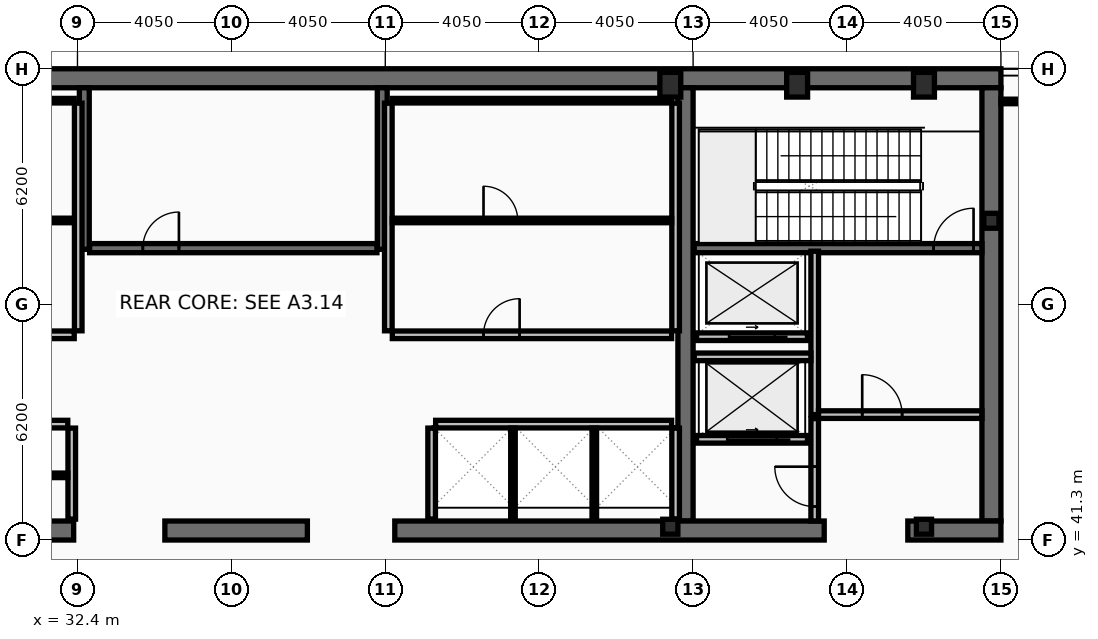
"""IFC4 building model, lengths in metres.
Left out: names, types, materials, properties, quantities, classifications, styles, units other than length and angle.
Written with IfcOpenShell. Run it as: python <this file> out.ifc"""

import sys

from ifc_helpers import new_model, si_unit, direction, frame, frame_2d, origin, origin_2d, place, context, subcontext, project, spatial, rectangle, hollow_rectangle, i_section, extrude, element, fill, save


model = new_model("IFC4")
c1 = context("Model", 3, precision=1e-05, world=origin(), true_north=direction((0.0, 1.0)))
c2 = subcontext(c1, "Body", "Model", "MODEL_VIEW")
j1 = project(units=[si_unit("LENGTHUNIT", "METRE"), si_unit("PLANEANGLEUNIT", "RADIAN")], contexts=[c1])
p1 = place(None, origin())
s1 = spatial("IfcSite", under=j1, at=p1, CompositionType="ELEMENT")
p2 = place(p1, origin())
s2 = spatial("IfcBuilding", under=s1, at=p2, CompositionType="ELEMENT")
p3 = place(p2, frame((0.0, 0.0, 350.6)))
s3 = spatial("IfcBuildingStorey", under=s2, at=p3, CompositionType="ELEMENT", Elevation=350.6)
p4 = place(p3, frame((16.2, 53.45, 0.0), z_axis=(0.0, 0.0, 1.0), x_axis=(1.0, 0.0, 0.0)))
e1 = element("IfcWall", 1, at=p4, inside=s3, PredefinedType="SHEAR", context=c2, shape_type="SweptSolid", body=[
    extrude(rectangle(XDim=40.5, YDim=0.5, at=frame_2d((20.25, 0.0))), origin(), (0.0, 0.0, 1.0), 5.4),
])
p5 = place(p3, frame((56.45, 53.2, 0.0), z_axis=(0.0, 0.0, 1.0), x_axis=(0.0, -1.0, 0.0)))
e2 = element("IfcWall", 2, at=p5, inside=s3, PredefinedType="SHEAR", context=c2, shape_type="SweptSolid", body=[
    extrude(rectangle(XDim=11.4, YDim=0.5, at=frame_2d((5.7, 0.0))), origin(), (0.0, 0.0, 1.0), 5.4),
])
p6 = place(p3, frame((48.4, 41.8, 0.0), z_axis=(0.0, 0.0, 1.0), x_axis=(0.0, 1.0, 0.0)))
e3 = element("IfcWall", 3, at=p6, inside=s3, PredefinedType="SHEAR", context=c2, shape_type="SweptSolid", body=[
    extrude(rectangle(XDim=11.4, YDim=0.4, at=frame_2d((5.7, 0.0))), origin(), (0.0, 0.0, 1.0), 5.4),
])
p7 = place(p3, frame((32.3, 41.55, 0.0), z_axis=(0.0, 0.0, 1.0), x_axis=(-1.0, 0.0, 0.0)))
e4 = element("IfcWall", 4, at=p7, inside=s3, PredefinedType="SHEAR", context=c2, shape_type="SweptSolid", body=[
    extrude(rectangle(XDim=11.45, YDim=0.5, at=frame_2d((5.725, 0.0))), origin(), (0.0, 0.0, 1.0), 5.4),
])
p8 = place(p3, frame((38.45, 41.55, 0.0), z_axis=(0.0, 0.0, 1.0), x_axis=(-1.0, 0.0, 0.0)))
e5 = element("IfcWall", 5, at=p8, inside=s3, PredefinedType="SHEAR", context=c2, shape_type="SweptSolid", body=[
    extrude(rectangle(XDim=3.75, YDim=0.5, at=frame_2d((1.875, 0.0))), origin(), (0.0, 0.0, 1.0), 5.4),
])
p9 = place(p3, frame((52.05, 41.55, 0.0), z_axis=(0.0, 0.0, 1.0), x_axis=(-1.0, 0.0, 0.0)))
e6 = element("IfcWall", 6, at=p9, inside=s3, PredefinedType="SHEAR", context=c2, shape_type="SweptSolid", body=[
    extrude(rectangle(XDim=11.3, YDim=0.5, at=frame_2d((5.65, 0.0))), origin(), (0.0, 0.0, 1.0), 5.4),
])
p10 = place(p3, frame((56.7, 41.55, 0.0), z_axis=(0.0, 0.0, 1.0), x_axis=(-1.0, 0.0, 0.0)))
e7 = element("IfcWall", 7, at=p10, inside=s3, PredefinedType="SHEAR", context=c2, shape_type="SweptSolid", body=[
    extrude(rectangle(XDim=2.45, YDim=0.5, at=frame_2d((1.225, 0.0))), origin(), (0.0, 0.0, 1.0), 5.4),
])
for number, where, z_axis, x_axis in (
    (8, (32.58, 48.95, 0.0), (0.0, 0.0, 1.0), (0.0, 1.0, 0.0)),
    (9, (40.42, 48.95, 0.0), (0.0, 0.0, 1.0), (0.0, 1.0, 0.0)),
):
    element("IfcWall", number, at=place(p3, frame(where, z_axis=z_axis, x_axis=x_axis)), inside=s3, PredefinedType="SHEAR", context=c2, shape_type="SweptSolid", body=[
        extrude(rectangle(XDim=4.25, YDim=0.26, at=frame_2d((2.125, 0.0))), origin(), (0.0, 0.0, 1.0), 5.4),
    ])
p11 = place(p3, frame((48.63, 48.98, 0.0), z_axis=(0.0, 0.0, 1.0), x_axis=(1.0, 0.0, 0.0)))
e10 = element("IfcWall", 10, at=p11, inside=s3, PredefinedType="SHEAR", context=c2, shape_type="SweptSolid", body=[
    extrude(rectangle(XDim=7.57, YDim=0.24, at=frame_2d((3.785, 0.0))), origin(), (0.0, 0.0, 1.0), 5.4),
])
p12 = place(p11, frame((6.3, 0.0, 0.0)))
e11 = element("IfcOpeningElement", 11, at=p12, cuts=e10, PredefinedType="OPENING", context=c2, shape_type="SweptSolid", body=[
    extrude(rectangle(XDim=1.05, YDim=2.15, at=frame_2d((0.525, 1.075))), frame((0.0, 0.13, 0.0), z_axis=(0.0, -1.0, 0.0), x_axis=(1.0, 0.0, 0.0)), (0.0, 0.0, 1.0), 0.26),
])
p13 = place(p3, frame((32.72, 48.98, 0.0), z_axis=(0.0, 0.0, 1.0), x_axis=(1.0, 0.0, 0.0)))
e12 = element("IfcWall", 12, at=p13, inside=s3, PredefinedType="SHEAR", context=c2, shape_type="SweptSolid", body=[
    extrude(rectangle(XDim=7.56, YDim=0.24, at=frame_2d((3.78, 0.0))), origin(), (0.0, 0.0, 1.0), 5.4),
])
p14 = place(p13, frame((1.4, 0.0, 0.0)))
e13 = element("IfcOpeningElement", 13, at=p14, cuts=e12, PredefinedType="OPENING", context=c2, shape_type="SweptSolid", body=[
    extrude(rectangle(XDim=0.95, YDim=2.1, at=frame_2d((0.475, 1.05))), frame((0.0, 0.13, 0.0), z_axis=(0.0, -1.0, 0.0), x_axis=(1.0, 0.0, 0.0)), (0.0, 0.0, 1.0), 0.26),
])
for number, where, z_axis, x_axis in (
    (14, (48.0, 53.28, 0.0), (0.0, 0.0, 1.0), (1.0, 0.0, 0.0)),
    (15, (51.337, 53.28, 0.0), (0.0, 0.0, 1.0), (1.0, 0.0, 0.0)),
    (16, (54.675, 53.28, 0.0), (0.0, 0.0, 1.0), (1.0, 0.0, 0.0)),
):
    element("IfcColumn", number, at=place(p3, frame(where, z_axis=z_axis, x_axis=x_axis)), inside=s3, PredefinedType="COLUMN", context=c2, shape_type="SweptSolid", body=[
        extrude(hollow_rectangle(XDim=0.55, YDim=0.65, WallThickness=0.04, at=origin_2d()), origin(), (0.0, 0.0, 1.0), 5.6),
    ])
for number, where, z_axis, x_axis in (
    (17, (56.45, 49.7, 0.0), (0.0, 0.0, 1.0), (1.0, 0.0, 0.0)),
    (18, (48.0, 41.65, 0.0), (0.0, 0.0, 1.0), (1.0, 0.0, 0.0)),
    (19, (54.675, 41.65, 0.0), (0.0, 0.0, 1.0), (1.0, 0.0, 0.0)),
):
    element("IfcColumn", number, at=place(p3, frame(where, z_axis=z_axis, x_axis=x_axis)), inside=s3, PredefinedType="COLUMN", context=c2, shape_type="SweptSolid", body=[
        extrude(i_section(OverallWidth=0.399, OverallDepth=0.393, WebThickness=0.023, FlangeThickness=0.037, at=origin_2d()), origin(), (0.0, 0.0, 1.0), 5.6),
    ])
p15 = place(p3, frame((51.61, 43.95, 0.0), z_axis=(0.0, 0.0, 1.0), x_axis=(-1.0, 0.0, 0.0)))
e20 = element("IfcWall", 20, at=p15, inside=s3, PredefinedType="PARTITIONING", context=c2, shape_type="SweptSolid", body=[
    extrude(rectangle(XDim=2.92, YDim=0.2, at=frame_2d((1.46, 0.0))), origin(), (0.0, 0.0, 1.0), 5.4),
])
p16 = place(p15, frame((0.81, 0.0, 0.0)))
e21 = element("IfcOpeningElement", 21, at=p16, cuts=e20, PredefinedType="OPENING", context=c2, shape_type="SweptSolid", body=[
    extrude(rectangle(XDim=1.3, YDim=2.18, at=frame_2d((0.65, 1.09))), frame((0.0, 0.11, 0.0), z_axis=(0.0, -1.0, 0.0), x_axis=(1.0, 0.0, 0.0)), (0.0, 0.0, 1.0), 0.22),
])
p17 = place(p3, frame((51.61, 46.65, 0.0), z_axis=(0.0, 0.0, 1.0), x_axis=(-1.0, 0.0, 0.0)))
e22 = element("IfcWall", 22, at=p17, inside=s3, PredefinedType="PARTITIONING", context=c2, shape_type="SweptSolid", body=[
    extrude(rectangle(XDim=2.92, YDim=0.2, at=frame_2d((1.46, 0.0))), origin(), (0.0, 0.0, 1.0), 5.4),
])
p18 = place(p17, frame((0.86, 0.0, 0.0)))
e23 = element("IfcOpeningElement", 23, at=p18, cuts=e22, PredefinedType="OPENING", context=c2, shape_type="SweptSolid", body=[
    extrude(rectangle(XDim=1.2, YDim=2.18, at=frame_2d((0.6, 1.09))), frame((0.0, 0.11, 0.0), z_axis=(0.0, -1.0, 0.0), x_axis=(1.0, 0.0, 0.0)), (0.0, 0.0, 1.0), 0.22),
])
p19 = place(p3, frame((51.8, 44.6, 0.0), z_axis=(0.0, 0.0, 1.0), x_axis=(0.0, 1.0, 0.0)))
e24 = element("IfcWall", 24, at=p19, inside=s3, PredefinedType="PARTITIONING", context=c2, shape_type="SweptSolid", body=[
    extrude(rectangle(XDim=4.3, YDim=0.2, at=frame_2d((2.15, 0.0))), origin(), (0.0, 0.0, 1.0), 5.4),
])
p20 = place(p3, frame((51.9, 44.6, 0.0), z_axis=(0.0, 0.0, 1.0), x_axis=(1.0, 0.0, 0.0)))
e25 = element("IfcWall", 25, at=p20, inside=s3, PredefinedType="PARTITIONING", context=c2, shape_type="SweptSolid", body=[
    extrude(rectangle(XDim=4.3, YDim=0.2, at=frame_2d((2.15, 0.0))), origin(), (0.0, 0.0, 1.0), 5.4),
])
p21 = place(p20, frame((1.15, 0.0, 0.0)))
e26 = element("IfcOpeningElement", 26, at=p21, cuts=e25, PredefinedType="OPENING", context=c2, shape_type="SweptSolid", body=[
    extrude(rectangle(XDim=1.05, YDim=2.15, at=frame_2d((0.525, 1.075))), frame((0.0, 0.11, 0.0), z_axis=(0.0, -1.0, 0.0), x_axis=(1.0, 0.0, 0.0)), (0.0, 0.0, 1.0), 0.22),
])
p22 = place(p3, frame((48.63, 46.12, 0.0), z_axis=(0.0, 0.0, 1.0), x_axis=(1.0, 0.0, 0.0)))
e27 = element("IfcWall", 27, at=p22, inside=s3, PredefinedType="PARTITIONING", context=c2, shape_type="SweptSolid", body=[
    extrude(rectangle(XDim=3.07, YDim=0.2, at=frame_2d((1.535, 0.0))), origin(), (0.0, 0.0, 1.0), 5.4),
])
p23 = place(p3, frame((51.8, 41.8, 0.0), z_axis=(0.0, 0.0, 1.0), x_axis=(0.0, 1.0, 0.0)))
e28 = element("IfcWall", 28, at=p23, inside=s3, PredefinedType="PARTITIONING", context=c2, shape_type="SweptSolid", body=[
    extrude(rectangle(XDim=2.695, YDim=0.2, at=frame_2d((1.348, 0.0))), origin(), (0.0, 0.0, 1.0), 5.4),
])
p24 = place(p23, frame((0.38, 0.0, 0.0)))
e29 = element("IfcOpeningElement", 29, at=p24, cuts=e28, PredefinedType="OPENING", context=c2, shape_type="SweptSolid", body=[
    extrude(rectangle(XDim=1.05, YDim=2.15, at=frame_2d((0.525, 1.075))), frame((0.0, 0.11, 0.0), z_axis=(0.0, -1.0, 0.0), x_axis=(1.0, 0.0, 0.0)), (0.0, 0.0, 1.0), 0.22),
])
p25 = place(p3, frame((32.42, 46.805, 0.0), z_axis=(0.0, 0.0, 1.0), x_axis=(0.0, 1.0, 0.0)))
e30 = element("IfcWall", 30, at=p25, inside=s3, PredefinedType="PARTITIONING", context=c2, shape_type="SweptSolid", body=[
    extrude(rectangle(XDim=5.99, YDim=0.2, at=frame_2d((2.995, 0.0))), origin(), (0.0, 0.0, 1.0), 5.4),
])
p26 = place(p3, frame((24.805, 52.86, 0.0), z_axis=(0.0, 0.0, 1.0), x_axis=(1.0, 0.0, 0.0)))
e31 = element("IfcWall", 31, at=p26, inside=s3, PredefinedType="PARTITIONING", context=c2, shape_type="SweptSolid", body=[
    extrude(rectangle(XDim=7.51, YDim=0.12, at=frame_2d((3.755, 0.0))), origin(), (0.0, 0.0, 1.0), 5.4),
])
p27 = place(p3, frame((24.805, 49.709, 0.0), z_axis=(0.0, 0.0, 1.0), x_axis=(1.0, 0.0, 0.0)))
e32 = element("IfcWall", 32, at=p27, inside=s3, PredefinedType="PARTITIONING", context=c2, shape_type="SweptSolid", body=[
    extrude(rectangle(XDim=7.51, YDim=0.12, at=frame_2d((3.755, 0.0))), origin(), (0.0, 0.0, 1.0), 5.4),
])
p28 = place(p27, frame((2.4, 0.0, 0.0)))
e33 = element("IfcOpeningElement", 33, at=p28, cuts=e32, PredefinedType="OPENING", context=c2, shape_type="SweptSolid", body=[
    extrude(rectangle(XDim=0.9, YDim=2.05, at=frame_2d((0.45, 1.025))), frame((0.0, 0.07, 0.0), z_axis=(0.0, -1.0, 0.0), x_axis=(1.0, 0.0, 0.0)), (0.0, 0.0, 1.0), 0.14),
])
p29 = place(p3, frame((24.805, 46.7, 0.0), z_axis=(0.0, 0.0, 1.0), x_axis=(1.0, 0.0, 0.0)))
e34 = element("IfcWall", 34, at=p29, inside=s3, PredefinedType="PARTITIONING", context=c2, shape_type="SweptSolid", body=[
    extrude(rectangle(XDim=7.51, YDim=0.2, at=frame_2d((3.755, 0.0))), origin(), (0.0, 0.0, 1.0), 5.4),
])
p30 = place(p29, frame((2.4, 0.0, 0.0)))
e35 = element("IfcOpeningElement", 35, at=p30, cuts=e34, PredefinedType="OPENING", context=c2, shape_type="SweptSolid", body=[
    extrude(rectangle(XDim=0.95, YDim=2.1, at=frame_2d((0.475, 1.05))), frame((0.0, 0.11, 0.0), z_axis=(0.0, -1.0, 0.0), x_axis=(1.0, 0.0, 0.0)), (0.0, 0.0, 1.0), 0.22),
])
p31 = place(p3, frame((32.25, 41.85, 0.0), z_axis=(0.0, 0.0, 1.0), x_axis=(0.0, 1.0, 0.0)))
e36 = element("IfcWall", 36, at=p31, inside=s3, PredefinedType="PARTITIONING", context=c2, shape_type="SweptSolid", body=[
    extrude(rectangle(XDim=2.395, YDim=0.2, at=frame_2d((1.198, 0.0))), origin(), (0.0, 0.0, 1.0), 5.4),
])
p32 = place(p3, frame((24.805, 43.002, 0.0), z_axis=(0.0, 0.0, 1.0), x_axis=(1.0, 0.0, 0.0)))
e37 = element("IfcWall", 37, at=p32, inside=s3, PredefinedType="PARTITIONING", context=c2, shape_type="SweptSolid", body=[
    extrude(rectangle(XDim=7.34, YDim=0.12, at=frame_2d((3.67, 0.0))), origin(), (0.0, 0.0, 1.0), 5.4),
])
p33 = place(p32, frame((2.4, 0.0, 0.0)))
e38 = element("IfcOpeningElement", 38, at=p33, cuts=e37, PredefinedType="OPENING", context=c2, shape_type="SweptSolid", body=[
    extrude(rectangle(XDim=0.9, YDim=2.05, at=frame_2d((0.45, 1.025))), frame((0.0, 0.07, 0.0), z_axis=(0.0, -1.0, 0.0), x_axis=(1.0, 0.0, 0.0)), (0.0, 0.0, 1.0), 0.14),
])
p34 = place(p3, frame((24.805, 44.35, 0.0), z_axis=(0.0, 0.0, 1.0), x_axis=(1.0, 0.0, 0.0)))
e39 = element("IfcWall", 39, at=p34, inside=s3, PredefinedType="PARTITIONING", context=c2, shape_type="SweptSolid", body=[
    extrude(rectangle(XDim=7.34, YDim=0.2, at=frame_2d((3.67, 0.0))), origin(), (0.0, 0.0, 1.0), 5.4),
])
p35 = place(p34, frame((2.4, 0.0, 0.0)))
e40 = element("IfcOpeningElement", 40, at=p35, cuts=e39, PredefinedType="OPENING", context=c2, shape_type="SweptSolid", body=[
    extrude(rectangle(XDim=0.95, YDim=2.1, at=frame_2d((0.475, 1.05))), frame((0.0, 0.11, 0.0), z_axis=(0.0, -1.0, 0.0), x_axis=(1.0, 0.0, 0.0)), (0.0, 0.0, 1.0), 0.22),
])
for number, where, z_axis, x_axis in (
    (41, (40.58, 46.805, 0.0), (0.0, 0.0, 1.0), (0.0, 1.0, 0.0)),
    (42, (48.14, 46.805, 0.0), (0.0, 0.0, 1.0), (0.0, 1.0, 0.0)),
):
    element("IfcWall", number, at=place(p3, frame(where, z_axis=z_axis, x_axis=x_axis)), inside=s3, PredefinedType="PARTITIONING", context=c2, shape_type="SweptSolid", body=[
        extrude(rectangle(XDim=5.99, YDim=0.2, at=frame_2d((2.995, 0.0))), origin(), (0.0, 0.0, 1.0), 5.4),
    ])
p36 = place(p3, frame((40.685, 52.86, 0.0), z_axis=(0.0, 0.0, 1.0), x_axis=(1.0, 0.0, 0.0)))
e43 = element("IfcWall", 43, at=p36, inside=s3, PredefinedType="PARTITIONING", context=c2, shape_type="SweptSolid", body=[
    extrude(rectangle(XDim=7.35, YDim=0.12, at=frame_2d((3.675, 0.0))), origin(), (0.0, 0.0, 1.0), 5.4),
])
p37 = place(p3, frame((40.685, 49.709, 0.0), z_axis=(0.0, 0.0, 1.0), x_axis=(1.0, 0.0, 0.0)))
e44 = element("IfcWall", 44, at=p37, inside=s3, PredefinedType="PARTITIONING", context=c2, shape_type="SweptSolid", body=[
    extrude(rectangle(XDim=7.35, YDim=0.12, at=frame_2d((3.675, 0.0))), origin(), (0.0, 0.0, 1.0), 5.4),
])
p38 = place(p37, frame((2.4, 0.0, 0.0)))
e45 = element("IfcOpeningElement", 45, at=p38, cuts=e44, PredefinedType="OPENING", context=c2, shape_type="SweptSolid", body=[
    extrude(rectangle(XDim=0.9, YDim=2.05, at=frame_2d((0.45, 1.025))), frame((0.0, 0.07, 0.0), z_axis=(0.0, -1.0, 0.0), x_axis=(1.0, 0.0, 0.0)), (0.0, 0.0, 1.0), 0.14),
])
p39 = place(p3, frame((40.685, 46.7, 0.0), z_axis=(0.0, 0.0, 1.0), x_axis=(1.0, 0.0, 0.0)))
e46 = element("IfcWall", 46, at=p39, inside=s3, PredefinedType="PARTITIONING", context=c2, shape_type="SweptSolid", body=[
    extrude(rectangle(XDim=7.35, YDim=0.2, at=frame_2d((3.675, 0.0))), origin(), (0.0, 0.0, 1.0), 5.4),
])
p40 = place(p39, frame((2.4, 0.0, 0.0)))
e47 = element("IfcOpeningElement", 47, at=p40, cuts=e46, PredefinedType="OPENING", context=c2, shape_type="SweptSolid", body=[
    extrude(rectangle(XDim=0.95, YDim=2.1, at=frame_2d((0.475, 1.05))), frame((0.0, 0.11, 0.0), z_axis=(0.0, -1.0, 0.0), x_axis=(1.0, 0.0, 0.0)), (0.0, 0.0, 1.0), 0.22),
])
p41 = place(p3, frame((41.825, 44.35, 0.0), z_axis=(0.0, 0.0, 1.0), x_axis=(1.0, 0.0, 0.0)))
e48 = element("IfcWall", 48, at=p41, inside=s3, PredefinedType="PARTITIONING", context=c2, shape_type="SweptSolid", body=[
    extrude(rectangle(XDim=6.21, YDim=0.2, at=frame_2d((3.105, 0.0))), origin(), (0.0, 0.0, 1.0), 5.4),
])
for number, where, z_axis, x_axis in (
    (49, (41.72, 41.85, 0.0), (0.0, 0.0, 1.0), (0.0, 1.0, 0.0)),
    (50, (48.14, 41.85, 0.0), (0.0, 0.0, 1.0), (0.0, 1.0, 0.0)),
):
    element("IfcWall", number, at=place(p3, frame(where, z_axis=z_axis, x_axis=x_axis)), inside=s3, PredefinedType="PARTITIONING", context=c2, shape_type="SweptSolid", body=[
        extrude(rectangle(XDim=2.395, YDim=0.2, at=frame_2d((1.198, 0.0))), origin(), (0.0, 0.0, 1.0), 5.4),
    ])
for number, where, z_axis, x_axis in (
    (51, (43.86, 41.85, 0.0), (0.0, 0.0, 1.0), (0.0, 1.0, 0.0)),
    (52, (46.0, 41.85, 0.0), (0.0, 0.0, 1.0), (0.0, 1.0, 0.0)),
):
    element("IfcWall", number, at=place(p3, frame(where, z_axis=z_axis, x_axis=x_axis)), inside=s3, PredefinedType="PARTITIONING", context=c2, shape_type="SweptSolid", body=[
        extrude(rectangle(XDim=2.395, YDim=0.12, at=frame_2d((1.198, 0.0))), origin(), (0.0, 0.0, 1.0), 5.4),
    ])
p42 = place(p3, frame((56.7, 52.84, 0.0), z_axis=(0.0, 0.0, 1.0), x_axis=(1.0, 0.0, 0.0)))
e53 = element("IfcWall", 53, at=p42, inside=s3, PredefinedType="PARTITIONING", context=c2, shape_type="SweptSolid", body=[
    extrude(rectangle(XDim=4.105, YDim=0.12, at=frame_2d((2.052, 0.0))), origin(), (0.0, 0.0, 1.0), 5.4),
])
p43 = place(p12, origin())
e54 = element("IfcDoor", 54, at=p43, inside=s3, OperationType="SINGLE_SWING_RIGHT", PredefinedType="DOOR", context=c2, shape_type="SweptSolid", body=[
    extrude(rectangle(XDim=1.05, YDim=2.15, at=frame_2d((0.525, 1.075))), frame((0.0, 0.025, 0.0), z_axis=(0.0, -1.0, 0.0), x_axis=(1.0, 0.0, 0.0)), (0.0, 0.0, 1.0), 0.05),
])
fill(e11, e54)
p44 = place(p14, origin())
e55 = element("IfcDoor", 55, at=p44, inside=s3, OperationType="SINGLE_SWING_RIGHT", PredefinedType="DOOR", context=c2, shape_type="SweptSolid", body=[
    extrude(rectangle(XDim=0.95, YDim=2.1, at=frame_2d((0.475, 1.05))), frame((0.0, 0.025, 0.0), z_axis=(0.0, -1.0, 0.0), x_axis=(1.0, 0.0, 0.0)), (0.0, 0.0, 1.0), 0.05),
])
fill(e13, e55)
p45 = place(p16, origin())
e56 = element("IfcDoor", 56, at=p45, inside=s3, OperationType="SLIDING_TO_LEFT", PredefinedType="DOOR", context=c2, shape_type="SweptSolid", body=[
    extrude(rectangle(XDim=1.3, YDim=2.18, at=frame_2d((0.65, 1.09))), frame((0.0, 0.025, 0.0), z_axis=(0.0, -1.0, 0.0), x_axis=(1.0, 0.0, 0.0)), (0.0, 0.0, 1.0), 0.05),
])
fill(e21, e56)
p46 = place(p18, origin())
e57 = element("IfcDoor", 57, at=p46, inside=s3, OperationType="SLIDING_TO_LEFT", PredefinedType="DOOR", context=c2, shape_type="SweptSolid", body=[
    extrude(rectangle(XDim=1.2, YDim=2.18, at=frame_2d((0.6, 1.09))), frame((0.0, 0.025, 0.0), z_axis=(0.0, -1.0, 0.0), x_axis=(1.0, 0.0, 0.0)), (0.0, 0.0, 1.0), 0.05),
])
fill(e23, e57)
p47 = place(p21, origin())
e58 = element("IfcDoor", 58, at=p47, inside=s3, OperationType="SINGLE_SWING_LEFT", PredefinedType="DOOR", context=c2, shape_type="SweptSolid", body=[
    extrude(rectangle(XDim=1.05, YDim=2.15, at=frame_2d((0.525, 1.075))), frame((0.0, 0.025, 0.0), z_axis=(0.0, -1.0, 0.0), x_axis=(1.0, 0.0, 0.0)), (0.0, 0.0, 1.0), 0.05),
])
fill(e26, e58)
p48 = place(p24, origin())
e59 = element("IfcDoor", 59, at=p48, inside=s3, OperationType="SINGLE_SWING_RIGHT", PredefinedType="DOOR", context=c2, shape_type="SweptSolid", body=[
    extrude(rectangle(XDim=1.05, YDim=2.15, at=frame_2d((0.525, 1.075))), frame((0.0, 0.025, 0.0), z_axis=(0.0, -1.0, 0.0), x_axis=(1.0, 0.0, 0.0)), (0.0, 0.0, 1.0), 0.05),
])
fill(e29, e59)
p49 = place(p38, origin())
e60 = element("IfcDoor", 60, at=p49, inside=s3, OperationType="SINGLE_SWING_LEFT", PredefinedType="DOOR", context=c2, shape_type="SweptSolid", body=[
    extrude(rectangle(XDim=0.9, YDim=2.05, at=frame_2d((0.45, 1.025))), frame((0.0, 0.025, 0.0), z_axis=(0.0, -1.0, 0.0), x_axis=(1.0, 0.0, 0.0)), (0.0, 0.0, 1.0), 0.05),
])
fill(e45, e60)
p50 = place(p40, origin())
e61 = element("IfcDoor", 61, at=p50, inside=s3, OperationType="SINGLE_SWING_RIGHT", PredefinedType="DOOR", context=c2, shape_type="SweptSolid", body=[
    extrude(rectangle(XDim=0.95, YDim=2.1, at=frame_2d((0.475, 1.05))), frame((0.0, 0.025, 0.0), z_axis=(0.0, -1.0, 0.0), x_axis=(1.0, 0.0, 0.0)), (0.0, 0.0, 1.0), 0.05),
])
fill(e47, e61)
save(model, sys.argv[1])
